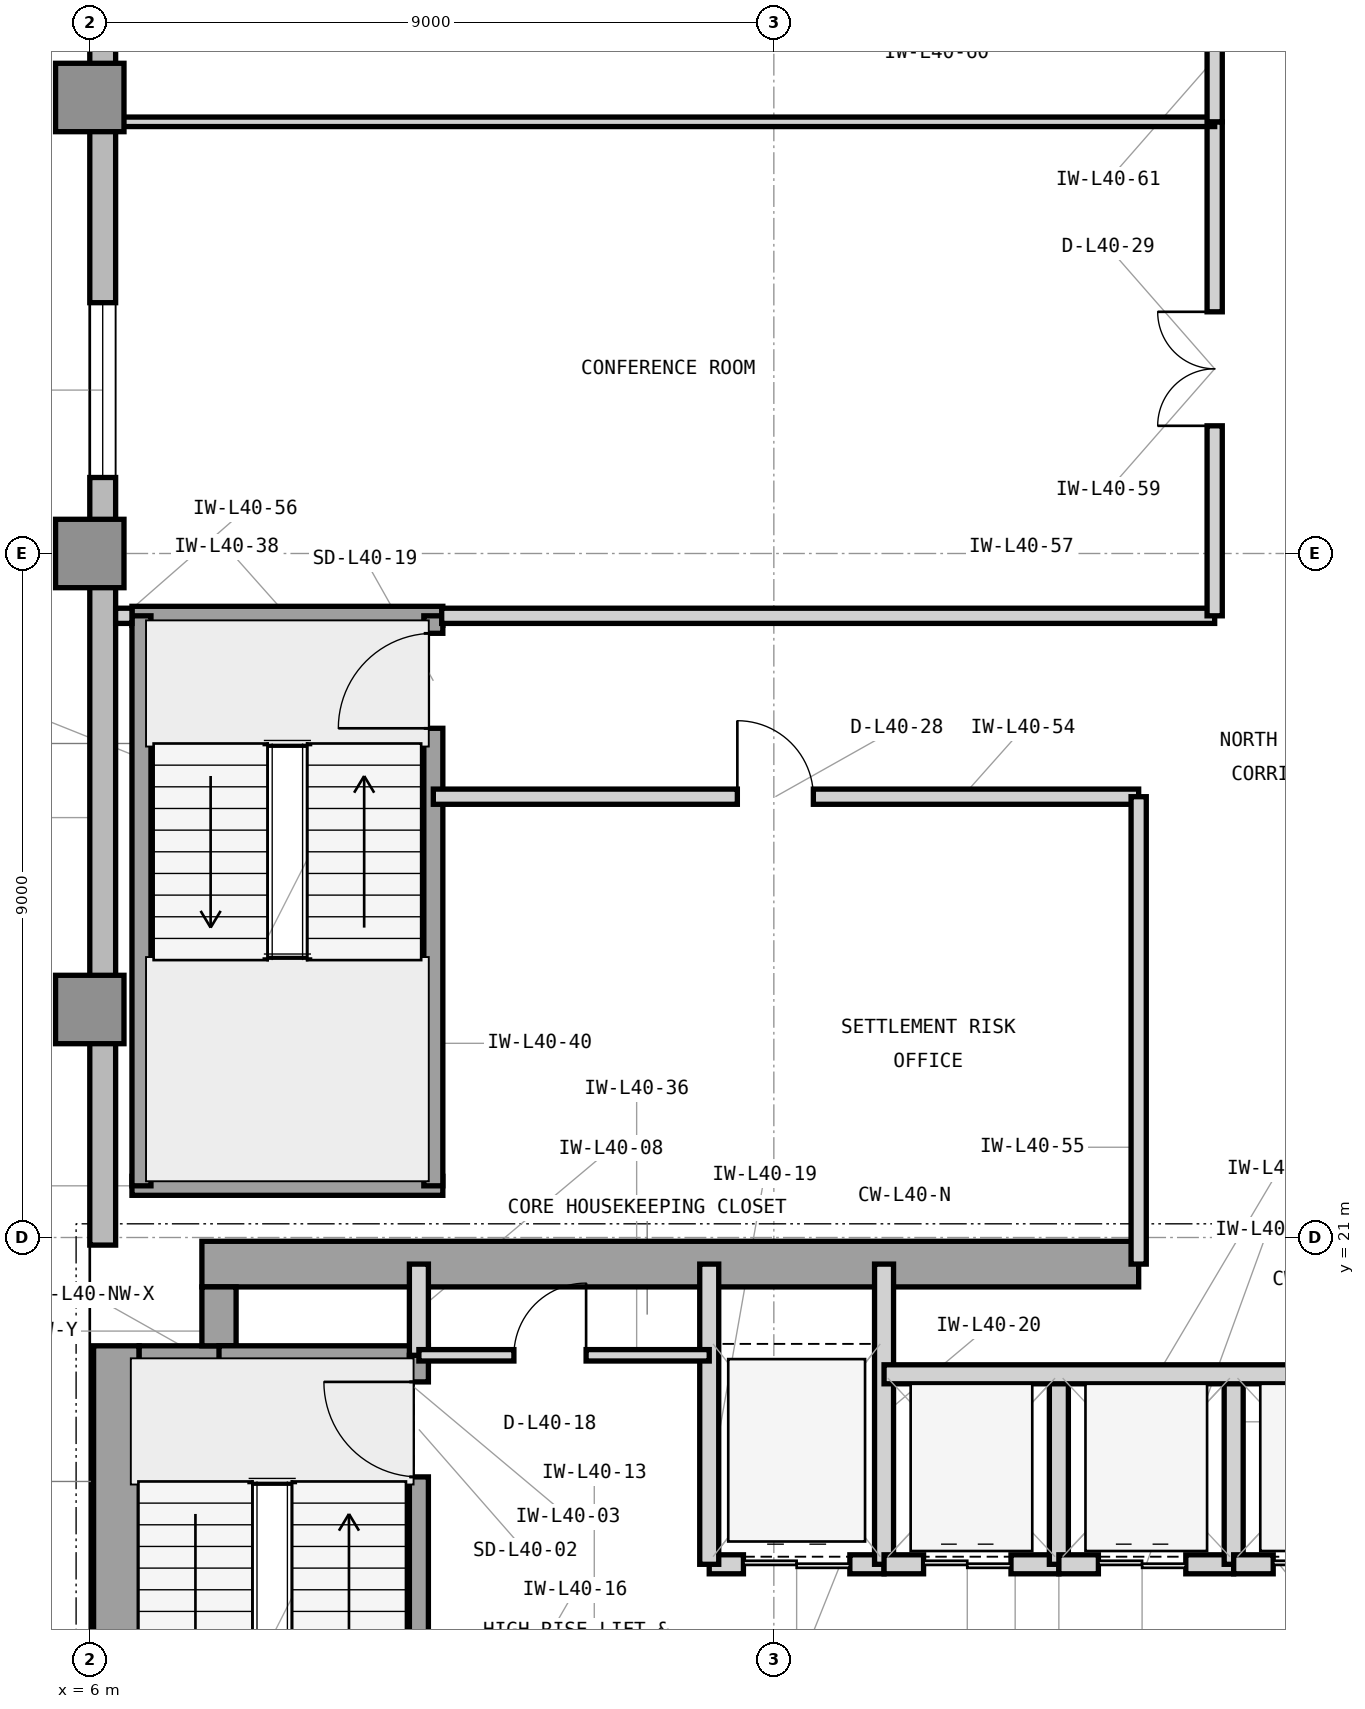
"""IFC4 building model, lengths in metres.
Left out: names, types, materials, properties, quantities, classifications, styles, units other than length and angle.
Written with IfcOpenShell. Run it as: python <this file> out.ifc"""

import sys

from ifc_helpers import new_model, si_unit, direction, frame, frame_2d, origin, origin_2d, place, context, subcontext, project, spatial, rectangle, extrude, element, fill, save


model = new_model("IFC4")
c1 = context("Model", 3, precision=1e-05, world=origin(), true_north=direction((0.0, 1.0)))
c2 = subcontext(c1, "Body", "Model", "MODEL_VIEW")
j1 = project(units=[si_unit("LENGTHUNIT", "METRE"), si_unit("PLANEANGLEUNIT", "RADIAN")], contexts=[c1])
p1 = place(None, origin())
s1 = spatial("IfcSite", under=j1, at=p1, CompositionType="ELEMENT")
p2 = place(p1, origin())
s2 = spatial("IfcBuilding", under=s1, at=p2, CompositionType="ELEMENT")
p3 = place(p2, frame((0.0, 0.0, 168.3)))
s3 = spatial("IfcBuildingStorey", under=s2, at=p3, CompositionType="ELEMENT", Elevation=168.3)
p4 = place(p3, frame((6.35, 4.425, 0.0), z_axis=(0.0, 0.0, 1.0), x_axis=(0.0, 1.0, 0.0)))
e1 = element("IfcWall", 1, at=p4, inside=s3, PredefinedType="SHEAR", context=c2, shape_type="SweptSolid", body=[
    extrude(rectangle(XDim=15.15, YDim=0.6, at=frame_2d((7.575, 0.0))), origin(), (0.0, 0.0, 1.0), 3.9),
])
p5 = place(p3, frame((7.475, 20.65, 0.0), z_axis=(0.0, 0.0, 1.0), x_axis=(1.0, 0.0, 0.0)))
e2 = element("IfcWall", 2, at=p5, inside=s3, PredefinedType="SHEAR", context=c2, shape_type="SweptSolid", body=[
    extrude(rectangle(XDim=12.325, YDim=0.6, at=frame_2d((6.163, 0.0))), origin(), (0.0, 0.0, 1.0), 3.9),
])
p6 = place(p3, frame((6.65, 19.35, 0.0), z_axis=(0.0, 0.0, 1.0), x_axis=(1.0, 0.0, 0.0)))
e3 = element("IfcWall", 3, at=p6, inside=s3, PredefinedType="SHEAR", context=c2, shape_type="SweptSolid", body=[
    extrude(rectangle(XDim=1.275, YDim=0.45, at=frame_2d((0.638, 0.0))), origin(), (0.0, 0.0, 1.0), 3.9),
])
p7 = place(p3, frame((7.7, 19.575, 0.0), z_axis=(0.0, 0.0, 1.0), x_axis=(0.0, 1.0, 0.0)))
e4 = element("IfcWall", 4, at=p7, inside=s3, PredefinedType="SHEAR", context=c2, shape_type="SweptSolid", body=[
    extrude(rectangle(XDim=0.775, YDim=0.45, at=frame_2d((0.388, 0.0))), origin(), (0.0, 0.0, 1.0), 3.9),
])
for number, where, z_axis, x_axis in (
    (5, (6.0, 24.0, 0.0), (0.0, 0.0, 1.0), (1.0, 0.0, 0.0)),
    (6, (6.0, 30.0, 0.0), (0.0, 0.0, 1.0), (1.0, 0.0, 0.0)),
    (7, (6.0, 36.0, 0.0), (0.0, 0.0, 1.0), (1.0, 0.0, 0.0)),
):
    element("IfcColumn", number, at=place(p3, frame(where, z_axis=z_axis, x_axis=x_axis)), inside=s3, PredefinedType="COLUMN", context=c2, shape_type="SweptSolid", body=[
        extrude(rectangle(XDim=0.9, YDim=0.9, at=origin_2d()), origin(), (0.0, 0.0, 1.0), 3.9),
    ])
p8 = place(p3, frame((6.17, 43.4, 0.0), z_axis=(0.0, 0.0, 1.0), x_axis=(0.0, -1.0, 0.0)))
e8 = element("IfcWall", 8, at=p8, inside=s3, PredefinedType="STANDARD", context=c2, shape_type="SweptSolid", body=[
    extrude(rectangle(XDim=22.5, YDim=0.34, at=frame_2d((11.25, 0.0))), origin(), (0.0, 0.0, 1.0), 3.7),
])
p9 = place(p8, frame((10.1, 0.0, 0.9)))
e9 = element("IfcOpeningElement", 9, at=p9, cuts=e8, PredefinedType="OPENING", context=c2, shape_type="SweptSolid", body=[
    extrude(rectangle(XDim=2.3, YDim=2.2, at=frame_2d((1.15, 1.1))), frame((0.0, 0.18, 0.0), z_axis=(0.0, -1.0, 0.0), x_axis=(1.0, 0.0, 0.0)), (0.0, 0.0, 1.0), 0.36),
])
p10 = place(p8, frame((5.425, 0.0, 0.9)))
e10 = element("IfcOpeningElement", 10, at=p10, cuts=e8, PredefinedType="OPENING", context=c2, shape_type="SweptSolid", body=[
    extrude(rectangle(XDim=1.2, YDim=2.2, at=frame_2d((0.6, 1.1))), frame((0.0, 0.18, 0.0), z_axis=(0.0, -1.0, 0.0), x_axis=(1.0, 0.0, 0.0)), (0.0, 0.0, 1.0), 0.36),
])
p11 = place(p3, frame((7.7, 19.45, 0.0), z_axis=(0.0, 0.0, 1.0), x_axis=(1.0, 0.0, 0.0)))
e11 = element("IfcWall", 11, at=p11, inside=s3, PredefinedType="SHEAR", context=c2, shape_type="SweptSolid", body=[
    extrude(rectangle(XDim=2.755, YDim=0.25, at=frame_2d((1.377, 0.0))), origin(), (0.0, 0.0, 1.0), 3.9),
])
p12 = place(p3, frame((10.33, 12.0, 0.0), z_axis=(0.0, 0.0, 1.0), x_axis=(0.0, 1.0, 0.0)))
e12 = element("IfcWall", 12, at=p12, inside=s3, PredefinedType="SHEAR", context=c2, shape_type="SweptSolid", body=[
    extrude(rectangle(XDim=7.45, YDim=0.25, at=frame_2d((3.725, 0.0))), origin(), (0.0, 0.0, 1.0), 3.9),
])
p13 = place(p12, frame((5.85, 0.0, 0.0)))
e13 = element("IfcOpeningElement", 13, at=p13, cuts=e12, PredefinedType="OPENING", context=c2, shape_type="SweptSolid", body=[
    extrude(rectangle(XDim=1.25, YDim=2.2, at=frame_2d((0.625, 1.1))), frame((0.0, 0.135, 0.0), z_axis=(0.0, -1.0, 0.0), x_axis=(1.0, 0.0, 0.0)), (0.0, 0.0, 1.0), 0.27),
])
p14 = place(p3, frame((10.33, 19.45, 0.0), z_axis=(0.0, 0.0, 1.0), x_axis=(0.0, 1.0, 0.0)))
e14 = element("IfcWall", 14, at=p14, inside=s3, PredefinedType="PARTITIONING", context=c2, shape_type="SweptSolid", body=[
    extrude(rectangle(XDim=1.2, YDim=0.25, at=frame_2d((0.6, 0.0))), origin(), (0.0, 0.0, 1.0), 3.073),
])
p15 = place(p3, frame((14.15, 16.7, 0.0), z_axis=(0.0, 0.0, 1.0), x_axis=(1.0, 0.0, 0.0)))
e15 = element("IfcWall", 15, at=p15, inside=s3, PredefinedType="PARTITIONING", context=c2, shape_type="SweptSolid", body=[
    extrude(rectangle(XDim=2.3, YDim=0.25, at=frame_2d((1.15, 0.0))), origin(), (0.0, 0.0, 1.0), 3.283),
])
p16 = place(p15, frame((0.45, 0.0, 0.0)))
e16 = element("IfcOpeningElement", 16, at=p16, cuts=e15, PredefinedType="OPENING", context=c2, shape_type="SweptSolid", body=[
    extrude(rectangle(XDim=1.4, YDim=2.35, at=frame_2d((0.7, 1.175))), frame((0.0, 0.135, 0.0), z_axis=(0.0, -1.0, 0.0), x_axis=(1.0, 0.0, 0.0)), (0.0, 0.0, 1.0), 0.27),
])
for number, where, z_axis, x_axis in (
    (17, (14.15, 16.7, 0.0), (0.0, 0.0, 1.0), (0.0, 1.0, 0.0)),
    (18, (16.45, 16.7, 0.0), (0.0, 0.0, 1.0), (0.0, 1.0, 0.0)),
):
    element("IfcWall", number, at=place(p3, frame(where, z_axis=z_axis, x_axis=x_axis)), inside=s3, PredefinedType="PARTITIONING", context=c2, shape_type="SweptSolid", body=[
        extrude(rectangle(XDim=3.95, YDim=0.25, at=frame_2d((1.975, 0.0))), origin(), (0.0, 0.0, 1.0), 3.69),
    ])
p17 = place(p3, frame((16.45, 16.7, 0.0), z_axis=(0.0, 0.0, 1.0), x_axis=(1.0, 0.0, 0.0)))
e19 = element("IfcWall", 19, at=p17, inside=s3, PredefinedType="PARTITIONING", context=c2, shape_type="SweptSolid", body=[
    extrude(rectangle(XDim=2.3, YDim=0.25, at=frame_2d((1.15, 0.0))), origin(), (0.0, 0.0, 1.0), 3.283),
])
p18 = place(p17, frame((0.52, 0.0, 0.0)))
e20 = element("IfcOpeningElement", 20, at=p18, cuts=e19, PredefinedType="OPENING", context=c2, shape_type="SweptSolid", body=[
    extrude(rectangle(XDim=1.15, YDim=2.25, at=frame_2d((0.575, 1.125))), frame((0.0, 0.135, 0.0), z_axis=(0.0, -1.0, 0.0), x_axis=(1.0, 0.0, 0.0)), (0.0, 0.0, 1.0), 0.27),
])
p19 = place(p3, frame((18.75, 16.7, 0.0), z_axis=(0.0, 0.0, 1.0), x_axis=(0.0, 1.0, 0.0)))
e21 = element("IfcWall", 21, at=p19, inside=s3, PredefinedType="PARTITIONING", context=c2, shape_type="SweptSolid", body=[
    extrude(rectangle(XDim=2.5, YDim=0.25, at=frame_2d((1.25, 0.0))), origin(), (0.0, 0.0, 1.0), 3.69),
])
p20 = place(p3, frame((18.75, 16.7, 0.0), z_axis=(0.0, 0.0, 1.0), x_axis=(1.0, 0.0, 0.0)))
e22 = element("IfcWall", 22, at=p20, inside=s3, PredefinedType="PARTITIONING", context=c2, shape_type="SweptSolid", body=[
    extrude(rectangle(XDim=2.3, YDim=0.25, at=frame_2d((1.15, 0.0))), origin(), (0.0, 0.0, 1.0), 3.283),
])
p21 = place(p20, frame((0.52, 0.0, 0.0)))
e23 = element("IfcOpeningElement", 23, at=p21, cuts=e22, PredefinedType="OPENING", context=c2, shape_type="SweptSolid", body=[
    extrude(rectangle(XDim=1.15, YDim=2.25, at=frame_2d((0.575, 1.125))), frame((0.0, 0.135, 0.0), z_axis=(0.0, -1.0, 0.0), x_axis=(1.0, 0.0, 0.0)), (0.0, 0.0, 1.0), 0.27),
])
p22 = place(p3, frame((21.05, 16.7, 0.0), z_axis=(0.0, 0.0, 1.0), x_axis=(0.0, 1.0, 0.0)))
e24 = element("IfcWall", 24, at=p22, inside=s3, PredefinedType="PARTITIONING", context=c2, shape_type="SweptSolid", body=[
    extrude(rectangle(XDim=2.5, YDim=0.25, at=frame_2d((1.25, 0.0))), origin(), (0.0, 0.0, 1.0), 3.69),
])
p23 = place(p3, frame((21.05, 16.7, 0.0), z_axis=(0.0, 0.0, 1.0), x_axis=(1.0, 0.0, 0.0)))
e25 = element("IfcWall", 25, at=p23, inside=s3, PredefinedType="PARTITIONING", context=c2, shape_type="SweptSolid", body=[
    extrude(rectangle(XDim=2.4, YDim=0.25, at=frame_2d((1.2, 0.0))), origin(), (0.0, 0.0, 1.0), 3.283),
])
p24 = place(p23, frame((0.52, 0.0, 0.0)))
e26 = element("IfcOpeningElement", 26, at=p24, cuts=e25, PredefinedType="OPENING", context=c2, shape_type="SweptSolid", body=[
    extrude(rectangle(XDim=1.15, YDim=2.25, at=frame_2d((0.575, 1.125))), frame((0.0, 0.135, 0.0), z_axis=(0.0, -1.0, 0.0), x_axis=(1.0, 0.0, 0.0)), (0.0, 0.0, 1.0), 0.27),
])
p25 = place(p3, frame((16.45, 19.2, 0.0), z_axis=(0.0, 0.0, 1.0), x_axis=(1.0, 0.0, 0.0)))
e27 = element("IfcWall", 27, at=p25, inside=s3, PredefinedType="PARTITIONING", context=c2, shape_type="SweptSolid", body=[
    extrude(rectangle(XDim=7.2, YDim=0.25, at=frame_2d((3.6, 0.0))), origin(), (0.0, 0.0, 1.0), 3.69),
])
p26 = place(p3, frame((10.33, 19.45, 0.0), z_axis=(0.0, 0.0, 1.0), x_axis=(1.0, 0.0, 0.0)))
e28 = element("IfcWall", 28, at=p26, inside=s3, PredefinedType="PARTITIONING", context=c2, shape_type="SweptSolid", body=[
    extrude(rectangle(XDim=3.82, YDim=0.15, at=frame_2d((1.91, 0.0))), origin(), (0.0, 0.0, 1.0), 3.69),
])
p27 = place(p26, frame((1.25, 0.0, 0.0)))
e29 = element("IfcOpeningElement", 29, at=p27, cuts=e28, PredefinedType="OPENING", context=c2, shape_type="SweptSolid", body=[
    extrude(rectangle(XDim=0.95, YDim=2.1, at=frame_2d((0.475, 1.05))), frame((0.0, 0.085, 0.0), z_axis=(0.0, -1.0, 0.0), x_axis=(1.0, 0.0, 0.0)), (0.0, 0.0, 1.0), 0.17),
])
for number, where, z_axis, x_axis in (
    (30, (6.555, 21.68, 0.0), (0.0, 0.0, 1.0), (1.0, 0.0, 0.0)),
    (31, (6.555, 29.18, 0.0), (0.0, 0.0, 1.0), (1.0, 0.0, 0.0)),
):
    element("IfcWall", number, at=place(p3, frame(where, z_axis=z_axis, x_axis=x_axis)), inside=s3, PredefinedType="SHEAR", context=c2, shape_type="SweptSolid", body=[
        extrude(rectangle(XDim=4.09, YDim=0.25, at=frame_2d((2.045, 0.0))), origin(), (0.0, 0.0, 1.0), 3.9),
    ])
p28 = place(p3, frame((6.68, 21.68, 0.0), z_axis=(0.0, 0.0, 1.0), x_axis=(0.0, 1.0, 0.0)))
e32 = element("IfcWall", 32, at=p28, inside=s3, PredefinedType="SHEAR", context=c2, shape_type="SweptSolid", body=[
    extrude(rectangle(XDim=7.5, YDim=0.25, at=frame_2d((3.75, 0.0))), origin(), (0.0, 0.0, 1.0), 3.9),
])
p29 = place(p3, frame((10.52, 21.68, 0.0), z_axis=(0.0, 0.0, 1.0), x_axis=(0.0, 1.0, 0.0)))
e33 = element("IfcWall", 33, at=p29, inside=s3, PredefinedType="SHEAR", context=c2, shape_type="SweptSolid", body=[
    extrude(rectangle(XDim=7.5, YDim=0.25, at=frame_2d((3.75, 0.0))), origin(), (0.0, 0.0, 1.0), 3.9),
])
p30 = place(p29, frame((6.02, 0.0, 0.0)))
e34 = element("IfcOpeningElement", 34, at=p30, cuts=e33, PredefinedType="OPENING", context=c2, shape_type="SweptSolid", body=[
    extrude(rectangle(XDim=1.25, YDim=2.2, at=frame_2d((0.625, 1.1))), frame((0.0, 0.135, 0.0), z_axis=(0.0, -1.0, 0.0), x_axis=(1.0, 0.0, 0.0)), (0.0, 0.0, 1.0), 0.27),
])
p31 = place(p3, frame((10.52, 26.8, 0.0), z_axis=(0.0, 0.0, 1.0), x_axis=(1.0, 0.0, 0.0)))
e35 = element("IfcWall", 35, at=p31, inside=s3, PredefinedType="PARTITIONING", context=c2, shape_type="SweptSolid", body=[
    extrude(rectangle(XDim=9.28, YDim=0.2, at=frame_2d((4.64, 0.0))), origin(), (0.0, 0.0, 1.0), 3.69),
])
p32 = place(p31, frame((4.0, 0.0, 0.0)))
e36 = element("IfcOpeningElement", 36, at=p32, cuts=e35, PredefinedType="OPENING", context=c2, shape_type="SweptSolid", body=[
    extrude(rectangle(XDim=1.0, YDim=2.15, at=frame_2d((0.5, 1.075))), frame((0.0, 0.11, 0.0), z_axis=(0.0, -1.0, 0.0), x_axis=(1.0, 0.0, 0.0)), (0.0, 0.0, 1.0), 0.22),
])
p33 = place(p3, frame((19.8, 20.65, 0.0), z_axis=(0.0, 0.0, 1.0), x_axis=(0.0, 1.0, 0.0)))
e37 = element("IfcWall", 37, at=p33, inside=s3, PredefinedType="PARTITIONING", context=c2, shape_type="SweptSolid", body=[
    extrude(rectangle(XDim=6.15, YDim=0.2, at=frame_2d((3.075, 0.0))), origin(), (0.0, 0.0, 1.0), 3.69),
])
p34 = place(p3, frame((6.34, 29.18, 0.0), z_axis=(0.0, 0.0, 1.0), x_axis=(1.0, 0.0, 0.0)))
e38 = element("IfcWall", 38, at=p34, inside=s3, PredefinedType="PARTITIONING", context=c2, shape_type="SweptSolid", body=[
    extrude(rectangle(XDim=0.215, YDim=0.2, at=frame_2d((0.107, 0.0))), origin(), (0.0, 0.0, 1.0), 3.69),
])
p35 = place(p3, frame((10.63, 29.18, 0.0), z_axis=(0.0, 0.0, 1.0), x_axis=(1.0, 0.0, 0.0)))
e39 = element("IfcWall", 39, at=p35, inside=s3, PredefinedType="PARTITIONING", context=c2, shape_type="SweptSolid", body=[
    extrude(rectangle(XDim=10.17, YDim=0.2, at=frame_2d((5.085, 0.0))), origin(), (0.0, 0.0, 1.0), 3.69),
])
p36 = place(p3, frame((20.8, 29.18, 0.0), z_axis=(0.0, 0.0, 1.0), x_axis=(0.0, 1.0, 0.0)))
e40 = element("IfcWall", 40, at=p36, inside=s3, PredefinedType="PARTITIONING", context=c2, shape_type="SweptSolid", body=[
    extrude(rectangle(XDim=6.5, YDim=0.2, at=frame_2d((3.25, 0.0))), origin(), (0.0, 0.0, 1.0), 3.69),
])
p37 = place(p36, frame((2.5, 0.0, 0.0)))
e41 = element("IfcOpeningElement", 41, at=p37, cuts=e40, PredefinedType="OPENING", context=c2, shape_type="SweptSolid", body=[
    extrude(rectangle(XDim=1.5, YDim=2.3, at=frame_2d((0.75, 1.15))), frame((0.0, 0.11, 0.0), z_axis=(0.0, -1.0, 0.0), x_axis=(1.0, 0.0, 0.0)), (0.0, 0.0, 1.0), 0.22),
])
p38 = place(p3, frame((6.18, 35.68, 0.0), z_axis=(0.0, 0.0, 1.0), x_axis=(1.0, 0.0, 0.0)))
e42 = element("IfcWall", 42, at=p38, inside=s3, PredefinedType="PARTITIONING", context=c2, shape_type="SweptSolid", body=[
    extrude(rectangle(XDim=14.62, YDim=0.125, at=frame_2d((7.31, 0.0))), origin(), (0.0, 0.0, 1.0), 3.69),
])
p39 = place(p3, frame((20.8, 35.68, 0.0), z_axis=(0.0, 0.0, 1.0), x_axis=(0.0, 1.0, 0.0)))
e43 = element("IfcWall", 43, at=p39, inside=s3, PredefinedType="PARTITIONING", context=c2, shape_type="SweptSolid", body=[
    extrude(rectangle(XDim=3.32, YDim=0.2, at=frame_2d((1.66, 0.0))), origin(), (0.0, 0.0, 1.0), 3.69),
])
p40 = place(p39, frame((1.16, 0.0, 0.0)))
e44 = element("IfcOpeningElement", 44, at=p40, cuts=e43, PredefinedType="OPENING", context=c2, shape_type="SweptSolid", body=[
    extrude(rectangle(XDim=1.0, YDim=2.15, at=frame_2d((0.5, 1.075))), frame((0.0, 0.11, 0.0), z_axis=(0.0, -1.0, 0.0), x_axis=(1.0, 0.0, 0.0)), (0.0, 0.0, 1.0), 0.22),
])
p41 = place(p9, origin())
e45 = element("IfcWindow", 45, at=p41, inside=s3, PartitioningType="SINGLE_PANEL", PredefinedType="WINDOW", context=c2, shape_type="SweptSolid", body=[
    extrude(rectangle(XDim=2.3, YDim=2.2, at=frame_2d((1.15, 1.1))), frame((0.0, 0.11, 0.0), z_axis=(0.0, -1.0, 0.0), x_axis=(1.0, 0.0, 0.0)), (0.0, 0.0, 1.0), 0.06),
])
fill(e9, e45)
p42 = place(p13, origin())
e46 = element("IfcDoor", 46, at=p42, inside=s3, OperationType="SINGLE_SWING_RIGHT", PredefinedType="DOOR", context=c2, shape_type="SweptSolid", body=[
    extrude(rectangle(XDim=1.25, YDim=2.2, at=frame_2d((0.625, 1.1))), frame((0.0, 0.025, 0.0), z_axis=(0.0, -1.0, 0.0), x_axis=(1.0, 0.0, 0.0)), (0.0, 0.0, 1.0), 0.05),
])
fill(e13, e46)
p43 = place(p16, origin())
e47 = element("IfcDoor", 47, at=p43, inside=s3, OperationType="DOUBLE_DOOR_SLIDING", PredefinedType="DOOR", context=c2, shape_type="SweptSolid", body=[
    extrude(rectangle(XDim=1.4, YDim=2.35, at=frame_2d((0.7, 1.175))), frame((0.0, 0.025, 0.0), z_axis=(0.0, -1.0, 0.0), x_axis=(1.0, 0.0, 0.0)), (0.0, 0.0, 1.0), 0.05),
])
fill(e16, e47)
p44 = place(p18, origin())
e48 = element("IfcDoor", 48, at=p44, inside=s3, OperationType="DOUBLE_DOOR_SLIDING", PredefinedType="DOOR", context=c2, shape_type="SweptSolid", body=[
    extrude(rectangle(XDim=1.15, YDim=2.25, at=frame_2d((0.575, 1.125))), frame((0.0, 0.025, 0.0), z_axis=(0.0, -1.0, 0.0), x_axis=(1.0, 0.0, 0.0)), (0.0, 0.0, 1.0), 0.05),
])
fill(e20, e48)
p45 = place(p21, origin())
e49 = element("IfcDoor", 49, at=p45, inside=s3, OperationType="DOUBLE_DOOR_SLIDING", PredefinedType="DOOR", context=c2, shape_type="SweptSolid", body=[
    extrude(rectangle(XDim=1.15, YDim=2.25, at=frame_2d((0.575, 1.125))), frame((0.0, 0.025, 0.0), z_axis=(0.0, -1.0, 0.0), x_axis=(1.0, 0.0, 0.0)), (0.0, 0.0, 1.0), 0.05),
])
fill(e23, e49)
p46 = place(p24, origin())
e50 = element("IfcDoor", 50, at=p46, inside=s3, OperationType="DOUBLE_DOOR_SLIDING", PredefinedType="DOOR", context=c2, shape_type="SweptSolid", body=[
    extrude(rectangle(XDim=1.15, YDim=2.25, at=frame_2d((0.575, 1.125))), frame((0.0, 0.025, 0.0), z_axis=(0.0, -1.0, 0.0), x_axis=(1.0, 0.0, 0.0)), (0.0, 0.0, 1.0), 0.05),
])
fill(e26, e50)
p47 = place(p27, origin())
e51 = element("IfcDoor", 51, at=p47, inside=s3, OperationType="SINGLE_SWING_RIGHT", PredefinedType="DOOR", context=c2, shape_type="SweptSolid", body=[
    extrude(rectangle(XDim=0.95, YDim=2.1, at=frame_2d((0.475, 1.05))), frame((0.0, 0.025, 0.0), z_axis=(0.0, -1.0, 0.0), x_axis=(1.0, 0.0, 0.0)), (0.0, 0.0, 1.0), 0.05),
])
fill(e29, e51)
p48 = place(p30, origin())
e52 = element("IfcDoor", 52, at=p48, inside=s3, OperationType="SINGLE_SWING_LEFT", PredefinedType="DOOR", context=c2, shape_type="SweptSolid", body=[
    extrude(rectangle(XDim=1.25, YDim=2.2, at=frame_2d((0.625, 1.1))), frame((0.0, 0.025, 0.0), z_axis=(0.0, -1.0, 0.0), x_axis=(1.0, 0.0, 0.0)), (0.0, 0.0, 1.0), 0.05),
])
fill(e34, e52)
p49 = place(p32, origin())
e53 = element("IfcDoor", 53, at=p49, inside=s3, OperationType="SINGLE_SWING_LEFT", PredefinedType="DOOR", context=c2, shape_type="SweptSolid", body=[
    extrude(rectangle(XDim=1.0, YDim=2.15, at=frame_2d((0.5, 1.075))), frame((0.0, 0.025, 0.0), z_axis=(0.0, -1.0, 0.0), x_axis=(1.0, 0.0, 0.0)), (0.0, 0.0, 1.0), 0.05),
])
fill(e36, e53)
p50 = place(p37, origin())
e54 = element("IfcDoor", 54, at=p50, inside=s3, OperationType="DOUBLE_DOOR_SINGLE_SWING", PredefinedType="DOOR", context=c2, shape_type="SweptSolid", body=[
    extrude(rectangle(XDim=1.5, YDim=2.3, at=frame_2d((0.75, 1.15))), frame((0.0, 0.025, 0.0), z_axis=(0.0, -1.0, 0.0), x_axis=(1.0, 0.0, 0.0)), (0.0, 0.0, 1.0), 0.05),
])
fill(e41, e54)
save(model, sys.argv[1])
